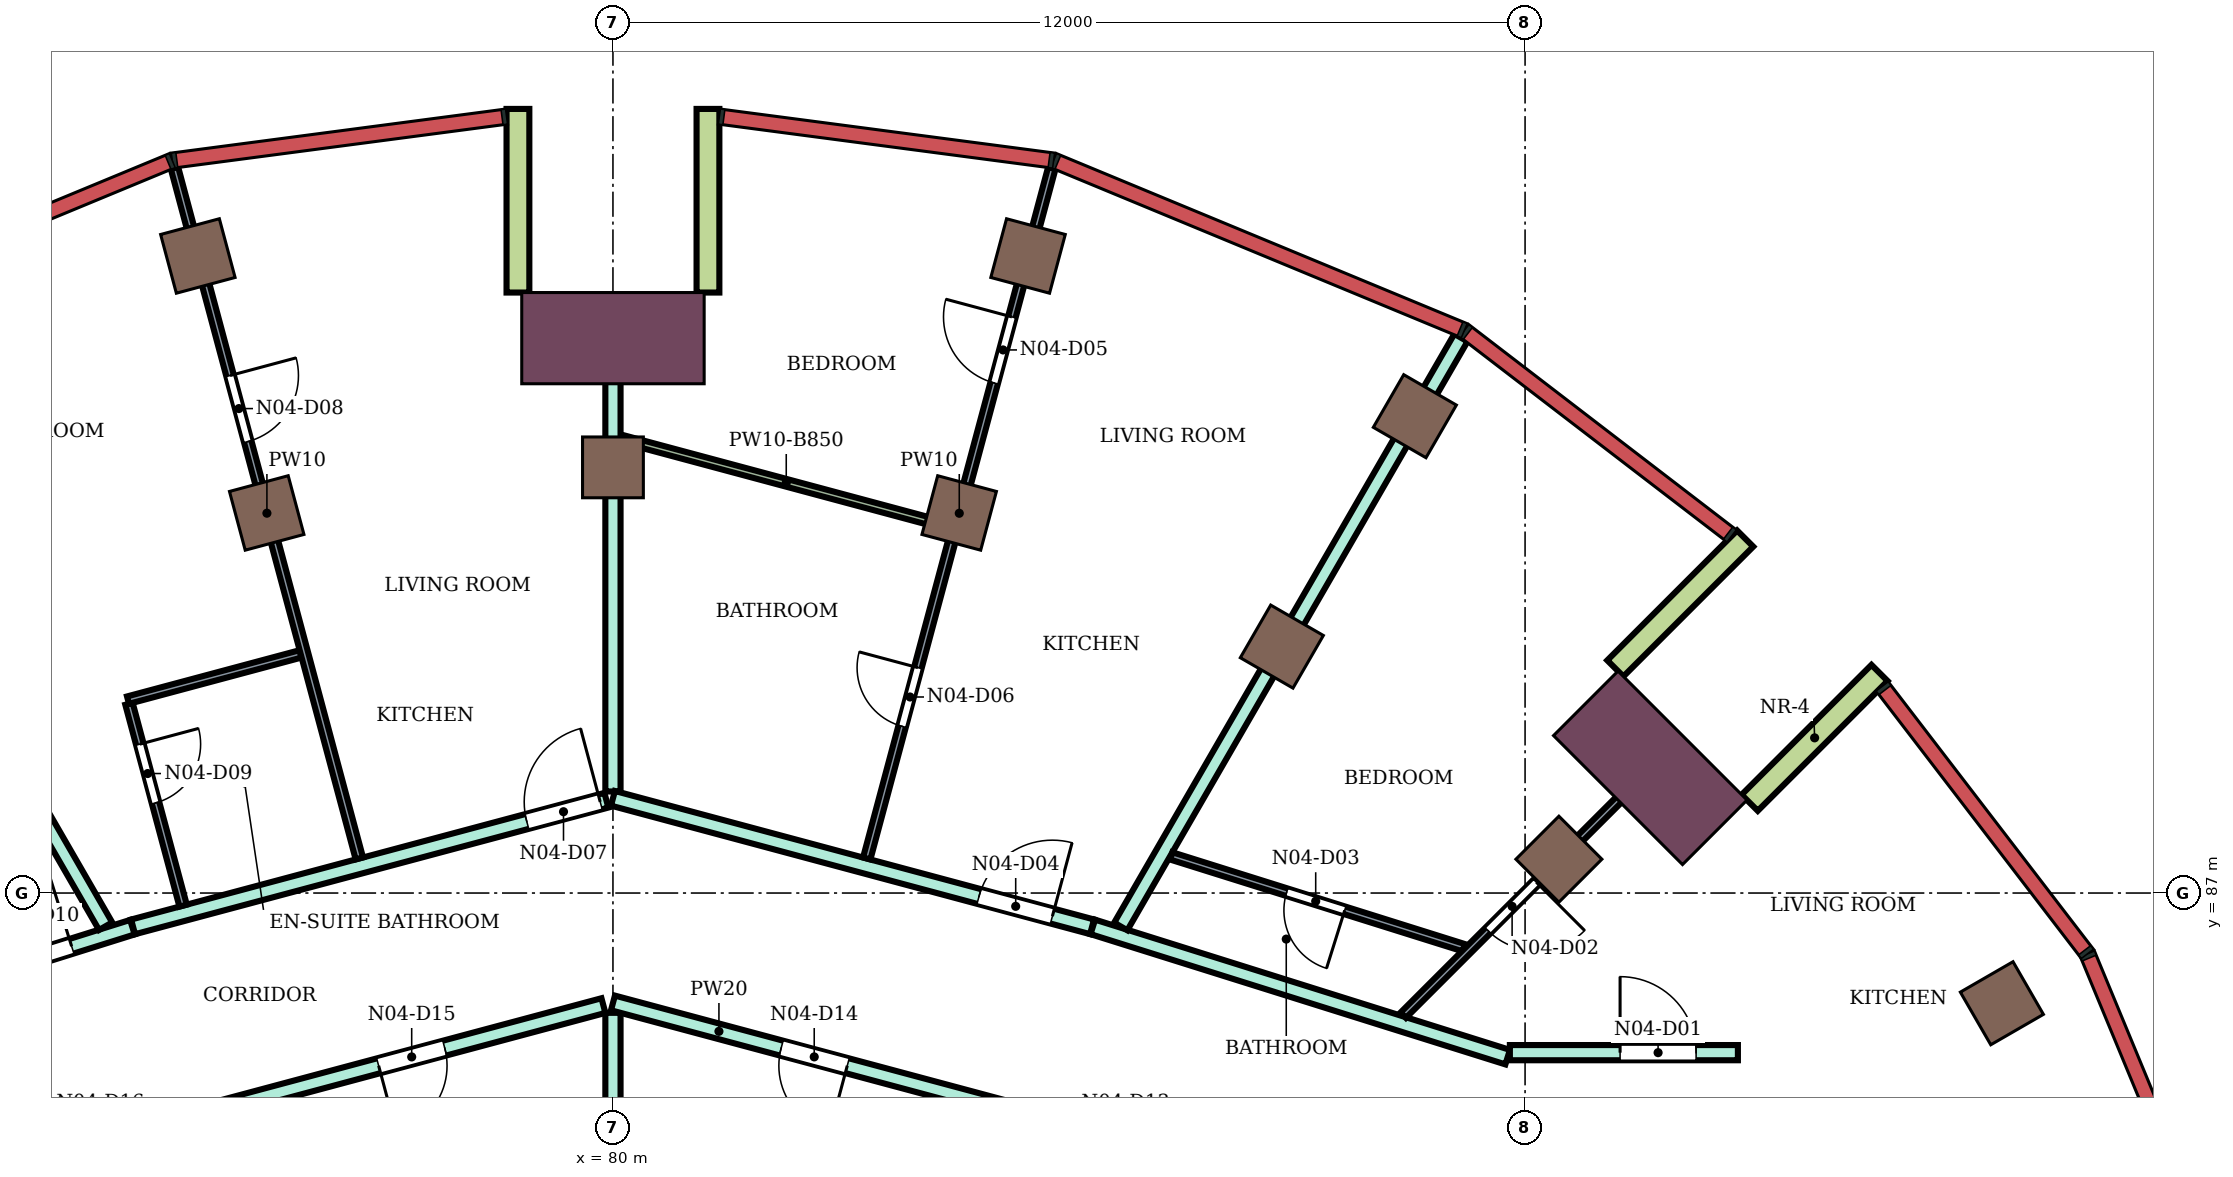
"""IFC4 building model, lengths in metres.
Left out: names, types, materials, properties, quantities, classifications, styles, units other than length and angle.
Written with IfcOpenShell. Run it as: python <this file> out.ifc"""

import sys

from ifc_helpers import new_model, si_unit, direction, frame, frame_2d, origin, origin_2d, place, context, subcontext, project, spatial, rectangle, extrude, element, fill, save


model = new_model("IFC4")
c1 = context("Model", 3, precision=1e-05, world=origin(), true_north=direction((0.0, 1.0)))
c2 = subcontext(c1, "Body", "Model", "MODEL_VIEW")
j1 = project(units=[si_unit("LENGTHUNIT", "METRE"), si_unit("PLANEANGLEUNIT", "RADIAN")], contexts=[c1])
p1 = place(None, origin())
s1 = spatial("IfcSite", under=j1, at=p1, CompositionType="ELEMENT")
p2 = place(p1, origin())
s2 = spatial("IfcBuilding", under=s1, at=p2, CompositionType="ELEMENT")
p3 = place(p2, frame((0.0, 0.0, 305.1)))
s3 = spatial("IfcBuildingStorey", under=s2, at=p3, CompositionType="ELEMENT", Elevation=305.1)
for number, where, z_axis, x_axis in (
    (1, (98.273, 85.55, 0.0), (0.0, 0.0, 1.0), (0.866, 0.5, 0.0)),
    (2, (90.55, 93.273, 0.0), (0.0, 0.0, 1.0), (0.5, 0.866, 0.0)),
    (3, (85.461, 95.381, 0.0), (0.0, 0.0, 1.0), (0.259, 0.966, 0.0)),
    (4, (74.539, 95.381, 0.0), (0.0, 0.0, 1.0), (-0.259, 0.966, 0.0)),
    (5, (92.445, 87.445, 0.0), (0.0, 0.0, 1.0), (0.707, 0.707, 0.0)),
    (6, (88.8, 90.242, 0.0), (0.0, 0.0, 1.0), (0.5, 0.866, 0.0)),
    (7, (84.555, 92.0, 0.0), (0.0, 0.0, 1.0), (0.259, 0.966, 0.0)),
    (8, (80.0, 92.6, 0.0), (0.0, 0.0, 1.0), (0.0, 1.0, 0.0)),
    (9, (75.445, 92.0, 0.0), (0.0, 0.0, 1.0), (-0.259, 0.966, 0.0)),
):
    element("IfcColumn", number, at=place(p3, frame(where, z_axis=z_axis, x_axis=x_axis)), inside=s3, PredefinedType="COLUMN", context=c2, shape_type="SweptSolid", body=[
        extrude(rectangle(XDim=0.8, YDim=0.8, at=origin_2d()), origin(), (0.0, 0.0, 1.0), 4.2),
    ])
for number, where, z_axis, x_axis in (
    (10, (93.647, 88.647, 0.0), (0.0, 0.0, 1.0), (0.707, 0.707, 0.0)),
    (11, (80.0, 94.3, 0.0), (0.0, 0.0, 1.0), (0.0, 1.0, 0.0)),
):
    element("IfcColumn", number, at=place(p3, frame(where, z_axis=z_axis, x_axis=x_axis)), inside=s3, PredefinedType="COLUMN", context=c2, shape_type="SweptSolid", body=[
        extrude(rectangle(XDim=1.2, YDim=2.4, at=origin_2d()), origin(), (0.0, 0.0, 1.0), 4.2),
    ])
for number, where, z_axis, x_axis in (
    (12, (94.955, 88.188, 0.0), (0.0, 0.0, 1.0), (0.707, 0.707, 0.0)),
    (13, (93.188, 89.955, 0.0), (0.0, 0.0, 1.0), (0.707, 0.707, 0.0)),
    (14, (81.25, 94.9, 0.0), (0.0, 0.0, 1.0), (0.0, 1.0, 0.0)),
    (15, (78.75, 94.9, 0.0), (0.0, 0.0, 1.0), (0.0, 1.0, 0.0)),
):
    element("IfcWall", number, at=place(p3, frame(where, z_axis=z_axis, x_axis=x_axis)), inside=s3, PredefinedType="NOTDEFINED", context=c2, shape_type="SweptSolid", body=[
        extrude(rectangle(XDim=2.416, YDim=0.3, at=frame_2d((1.208, 0.0))), origin(), (0.0, 0.0, 1.0), 4.2),
    ])
p4 = place(p3, frame((68.2, 84.833, 0.0), z_axis=(0.0, 0.0, 1.0), x_axis=(0.954191968402, 0.299195065863, 0.0)))
e16 = element("IfcWall", 16, at=p4, inside=s3, PredefinedType="PARTITIONING", context=c2, shape_type="SweptSolid", body=[
    extrude(rectangle(XDim=5.74, YDim=0.2, at=frame_2d((2.87, 0.0))), origin(), (0.0, 0.0, 1.0), 3.75),
])
p5 = place(p4, frame((3.903, 0.0, 0.0)))
e17 = element("IfcOpeningElement", 17, at=p5, cuts=e16, PredefinedType="OPENING", context=c2, shape_type="SweptSolid", body=[
    extrude(rectangle(XDim=1.0, YDim=2.1, at=frame_2d((0.5, 1.05))), frame((0.0, 0.11, 0.0), z_axis=(0.0, -1.0, 0.0), x_axis=(1.0, 0.0, 0.0)), (0.0, 0.0, 1.0), 0.22),
])
p6 = place(p3, frame((68.854, 94.312, 0.0), z_axis=(0.0, 0.0, 1.0), x_axis=(0.499901994742, -0.866081979753, 0.0)))
e18 = element("IfcWall", 18, at=p6, inside=s3, PredefinedType="PARTITIONING", context=c2, shape_type="SweptSolid", body=[
    extrude(rectangle(XDim=8.946, YDim=0.2, at=frame_2d((4.473, 0.0))), origin(), (0.0, 0.0, 1.0), 3.75),
])
p7 = place(p3, frame((73.687, 86.555, 0.0), z_axis=(0.0, 0.0, 1.0), x_axis=(0.966020868517, 0.258464081818, 0.0)))
e19 = element("IfcWall", 19, at=p7, inside=s3, PredefinedType="PARTITIONING", context=c2, shape_type="SweptSolid", body=[
    extrude(rectangle(XDim=6.446, YDim=0.2, at=frame_2d((3.223, 0.0))), origin(), (0.0, 0.0, 1.0), 3.75),
])
p8 = place(p7, frame((5.362, 0.0, 0.0)))
e20 = element("IfcOpeningElement", 20, at=p8, cuts=e19, PredefinedType="OPENING", context=c2, shape_type="SweptSolid", body=[
    extrude(rectangle(XDim=1.0, YDim=2.1, at=frame_2d((0.5, 1.05))), frame((0.0, 0.11, 0.0), z_axis=(0.0, -1.0, 0.0), x_axis=(1.0, 0.0, 0.0)), (0.0, 0.0, 1.0), 0.22),
])
p9 = place(p3, frame((74.413, 84.057, 0.0), z_axis=(0.0, 0.0, 1.0), x_axis=(0.965972135939, 0.258646153246, 0.0)))
e21 = element("IfcWall", 21, at=p9, inside=s3, PredefinedType="PARTITIONING", context=c2, shape_type="SweptSolid", body=[
    extrude(rectangle(XDim=5.654, YDim=0.2, at=frame_2d((2.827, 0.0))), origin(), (0.0, 0.0, 1.0), 3.75),
])
p10 = place(p9, frame((2.593, 0.0, 0.0)))
e22 = element("IfcOpeningElement", 22, at=p10, cuts=e21, PredefinedType="OPENING", context=c2, shape_type="SweptSolid", body=[
    extrude(rectangle(XDim=0.9, YDim=2.1, at=frame_2d((0.45, 1.05))), frame((0.0, 0.11, 0.0), z_axis=(0.0, -1.0, 0.0), x_axis=(1.0, 0.0, 0.0)), (0.0, 0.0, 1.0), 0.22),
])
p11 = place(p3, frame((80.0, 82.699, 0.0), z_axis=(0.0, 0.0, 1.0), x_axis=(0.0, 1.0, 0.0)))
e23 = element("IfcWall", 23, at=p11, inside=s3, PredefinedType="PARTITIONING", context=c2, shape_type="SweptSolid", body=[
    extrude(rectangle(XDim=2.725, YDim=0.2, at=frame_2d((1.363, 0.0))), origin(), (0.0, 0.0, 1.0), 3.75),
])
p12 = place(p3, frame((80.0, 85.554, 0.0), z_axis=(0.0, 0.0, 1.0), x_axis=(0.965928989968, -0.258807237802, 0.0)))
e24 = element("IfcWall", 24, at=p12, inside=s3, PredefinedType="PARTITIONING", context=c2, shape_type="SweptSolid", body=[
    extrude(rectangle(XDim=5.774, YDim=0.2, at=frame_2d((2.887, 0.0))), origin(), (0.0, 0.0, 1.0), 3.75),
])
p13 = place(p12, frame((2.292, 0.0, 0.0)))
e25 = element("IfcOpeningElement", 25, at=p13, cuts=e24, PredefinedType="OPENING", context=c2, shape_type="SweptSolid", body=[
    extrude(rectangle(XDim=0.9, YDim=2.1, at=frame_2d((0.45, 1.05))), frame((0.0, 0.11, 0.0), z_axis=(0.0, -1.0, 0.0), x_axis=(1.0, 0.0, 0.0)), (0.0, 0.0, 1.0), 0.22),
])
p14 = place(p3, frame((80.0, 88.336, 0.0), z_axis=(0.0, 0.0, 1.0), x_axis=(0.0, 1.0, 0.0)))
e26 = element("IfcWall", 26, at=p14, inside=s3, PredefinedType="PARTITIONING", context=c2, shape_type="SweptSolid", body=[
    extrude(rectangle(XDim=6.364, YDim=0.2, at=frame_2d((3.182, 0.0))), origin(), (0.0, 0.0, 1.0), 3.75),
])
p15 = place(p3, frame((80.0, 88.246, 0.0), z_axis=(0.0, 0.0, 1.0), x_axis=(0.965866355913, -0.25904088966, 0.0)))
e27 = element("IfcWall", 27, at=p15, inside=s3, PredefinedType="PARTITIONING", context=c2, shape_type="SweptSolid", body=[
    extrude(rectangle(XDim=6.526, YDim=0.2, at=frame_2d((3.263, 0.0))), origin(), (0.0, 0.0, 1.0), 3.75),
])
p16 = place(p15, frame((4.986, 0.0, 0.0)))
e28 = element("IfcOpeningElement", 28, at=p16, cuts=e27, PredefinedType="OPENING", context=c2, shape_type="SweptSolid", body=[
    extrude(rectangle(XDim=1.0, YDim=2.1, at=frame_2d((0.5, 1.05))), frame((0.0, 0.11, 0.0), z_axis=(0.0, -1.0, 0.0), x_axis=(1.0, 0.0, 0.0)), (0.0, 0.0, 1.0), 0.22),
])
p17 = place(p3, frame((86.313, 86.554, 0.0), z_axis=(0.0, 0.0, 1.0), x_axis=(0.954081217458, -0.299548043717, 0.0)))
e29 = element("IfcWall", 29, at=p17, inside=s3, PredefinedType="PARTITIONING", context=c2, shape_type="SweptSolid", body=[
    extrude(rectangle(XDim=5.721, YDim=0.2, at=frame_2d((2.86, 0.0))), origin(), (0.0, 0.0, 1.0), 3.75),
])
p18 = place(p3, frame((86.681, 86.56, 0.0), z_axis=(0.0, 0.0, 1.0), x_axis=(0.500262593568, 0.865873742226, 0.0)))
e30 = element("IfcWall", 30, at=p18, inside=s3, PredefinedType="PARTITIONING", context=c2, shape_type="SweptSolid", body=[
    extrude(rectangle(XDim=8.946, YDim=0.2, at=frame_2d((4.473, 0.0))), origin(), (0.0, 0.0, 1.0), 3.75),
])
p19 = place(p3, frame((91.8, 84.9, 0.0), z_axis=(0.0, 0.0, 1.0), x_axis=(1.0, 0.0, 0.0)))
e31 = element("IfcWall", 31, at=p19, inside=s3, PredefinedType="PARTITIONING", context=c2, shape_type="SweptSolid", body=[
    extrude(rectangle(XDim=3.0, YDim=0.2, at=frame_2d((1.5, 0.0))), origin(), (0.0, 0.0, 1.0), 3.75),
])
p20 = place(p19, frame((1.45, 0.0, 0.0)))
e32 = element("IfcOpeningElement", 32, at=p20, cuts=e31, PredefinedType="OPENING", context=c2, shape_type="SweptSolid", body=[
    extrude(rectangle(XDim=1.0, YDim=2.1, at=frame_2d((0.5, 1.05))), frame((0.0, 0.11, 0.0), z_axis=(0.0, -1.0, 0.0), x_axis=(1.0, 0.0, 0.0)), (0.0, 0.0, 1.0), 0.22),
])
p21 = place(p3, frame((73.633, 89.49, 0.0), z_axis=(0.0, 0.0, 1.0), x_axis=(0.259005329799, -0.965875892201, 0.0)))
e33 = element("IfcWall", 33, at=p21, inside=s3, PredefinedType="PARTITIONING", context=c2, shape_type="SweptSolid", body=[
    extrude(rectangle(XDim=2.75, YDim=0.1, at=frame_2d((1.375, 0.0))), origin(), (0.0, 0.0, 1.0), 3.75),
])
p22 = place(p21, frame((0.55, 0.0, 0.0)))
e34 = element("IfcOpeningElement", 34, at=p22, cuts=e33, PredefinedType="OPENING", context=c2, shape_type="SweptSolid", body=[
    extrude(rectangle(XDim=0.8, YDim=2.1, at=frame_2d((0.4, 1.05))), frame((0.0, 0.06, 0.0), z_axis=(0.0, -1.0, 0.0), x_axis=(1.0, 0.0, 0.0)), (0.0, 0.0, 1.0), 0.12),
])
p23 = place(p3, frame((73.62, 89.538, 0.0), z_axis=(0.0, 0.0, 1.0), x_axis=(0.965948051503, 0.258736085224, 0.0)))
e35 = element("IfcWall", 35, at=p23, inside=s3, PredefinedType="PARTITIONING", context=c2, shape_type="SweptSolid", body=[
    extrude(rectangle(XDim=2.35, YDim=0.1, at=frame_2d((1.175, 0.0))), origin(), (0.0, 0.0, 1.0), 3.75),
])
p24 = place(p3, frame((74.231, 96.539, 0.0), z_axis=(0.0, 0.0, 1.0), x_axis=(0.258666006211, -0.965966819943, 0.0)))
e36 = element("IfcWall", 36, at=p24, inside=s3, PredefinedType="PARTITIONING", context=c2, shape_type="SweptSolid", body=[
    extrude(rectangle(XDim=9.404, YDim=0.1, at=frame_2d((4.702, 0.0))), origin(), (0.0, 0.0, 1.0), 3.75),
])
p25 = place(p24, frame((2.827, 0.0, 0.0)))
e37 = element("IfcOpeningElement", 37, at=p25, cuts=e36, PredefinedType="OPENING", context=c2, shape_type="SweptSolid", body=[
    extrude(rectangle(XDim=0.9, YDim=2.1, at=frame_2d((0.45, 1.05))), frame((0.0, 0.06, 0.0), z_axis=(0.0, -1.0, 0.0), x_axis=(1.0, 0.0, 0.0)), (0.0, 0.0, 1.0), 0.12),
])
p26 = place(p3, frame((80.106, 92.98, 0.0), z_axis=(0.0, 0.0, 1.0), x_axis=(0.965835883926, -0.259154481575, 0.0)))
e38 = element("IfcWall", 38, at=p26, inside=s3, PredefinedType="PARTITIONING", context=c2, shape_type="SweptSolid", body=[
    extrude(rectangle(XDim=4.501, YDim=0.1, at=frame_2d((2.25, 0.0))), origin(), (0.0, 0.0, 1.0), 3.35),
])
p27 = place(p3, frame((83.339, 87.455, 0.0), z_axis=(0.0, 0.0, 1.0), x_axis=(0.258921222541, 0.965898442135, 0.0)))
e39 = element("IfcWall", 39, at=p27, inside=s3, PredefinedType="PARTITIONING", context=c2, shape_type="SweptSolid", body=[
    extrude(rectangle(XDim=9.404, YDim=0.1, at=frame_2d((4.702, 0.0))), origin(), (0.0, 0.0, 1.0), 3.75),
])
p28 = place(p27, frame((6.476, 0.0, 0.0)))
e40 = element("IfcOpeningElement", 40, at=p28, cuts=e39, PredefinedType="OPENING", context=c2, shape_type="SweptSolid", body=[
    extrude(rectangle(XDim=0.9, YDim=2.1, at=frame_2d((0.45, 1.05))), frame((0.0, 0.06, 0.0), z_axis=(0.0, -1.0, 0.0), x_axis=(1.0, 0.0, 0.0)), (0.0, 0.0, 1.0), 0.12),
])
p29 = place(p27, frame((1.799, 0.0, 0.0)))
e41 = element("IfcOpeningElement", 41, at=p29, cuts=e39, PredefinedType="OPENING", context=c2, shape_type="SweptSolid", body=[
    extrude(rectangle(XDim=0.8, YDim=2.1, at=frame_2d((0.4, 1.05))), frame((0.0, 0.06, 0.0), z_axis=(0.0, -1.0, 0.0), x_axis=(1.0, 0.0, 0.0)), (0.0, 0.0, 1.0), 0.12),
])
p30 = place(p3, frame((87.345, 87.488, 0.0), z_axis=(0.0, 0.0, 1.0), x_axis=(0.954151912322, -0.299322782647, 0.0)))
e42 = element("IfcWall", 42, at=p30, inside=s3, PredefinedType="PARTITIONING", context=c2, shape_type="SweptSolid", body=[
    extrude(rectangle(XDim=4.032, YDim=0.1, at=frame_2d((2.016, 0.0))), origin(), (0.0, 0.0, 1.0), 3.75),
])
p31 = place(p30, frame((1.591, 0.0, 0.0)))
e43 = element("IfcOpeningElement", 43, at=p31, cuts=e42, PredefinedType="OPENING", context=c2, shape_type="SweptSolid", body=[
    extrude(rectangle(XDim=0.8, YDim=2.1, at=frame_2d((0.4, 1.05))), frame((0.0, 0.06, 0.0), z_axis=(0.0, -1.0, 0.0), x_axis=(1.0, 0.0, 0.0)), (0.0, 0.0, 1.0), 0.12),
])
p32 = place(p3, frame((90.397, 85.393, 0.0), z_axis=(0.0, 0.0, 1.0), x_axis=(0.70720443438, 0.707009114505, 0.0)))
e44 = element("IfcWall", 44, at=p32, inside=s3, PredefinedType="PARTITIONING", context=c2, shape_type="SweptSolid", body=[
    extrude(rectangle(XDim=5.0, YDim=0.1, at=frame_2d((2.5, 0.0))), origin(), (0.0, 0.0, 1.0), 3.75),
])
p33 = place(p32, frame((1.575, 0.0, 0.0)))
e45 = element("IfcOpeningElement", 45, at=p33, cuts=e44, PredefinedType="OPENING", context=c2, shape_type="SweptSolid", body=[
    extrude(rectangle(XDim=0.9, YDim=2.1, at=frame_2d((0.45, 1.05))), frame((0.0, 0.06, 0.0), z_axis=(0.0, -1.0, 0.0), x_axis=(1.0, 0.0, 0.0)), (0.0, 0.0, 1.0), 0.12),
])
p34 = place(p20, origin())
e46 = element("IfcDoor", 46, at=p34, inside=s3, OperationType="SINGLE_SWING_LEFT", PredefinedType="DOOR", context=c2, shape_type="SweptSolid", body=[
    extrude(rectangle(XDim=1.0, YDim=2.1, at=frame_2d((0.5, 1.05))), frame((0.0, 0.025, 0.0), z_axis=(0.0, -1.0, 0.0), x_axis=(1.0, 0.0, 0.0)), (0.0, 0.0, 1.0), 0.05),
])
fill(e32, e46)
p35 = place(p33, frame((0.9, 0.0, 0.0), z_axis=(0.0, 0.0, 1.0), x_axis=(-1.0, 0.0, 0.0)))
e47 = element("IfcDoor", 47, at=p35, inside=s3, OperationType="SINGLE_SWING_LEFT", PredefinedType="DOOR", context=c2, shape_type="SweptSolid", body=[
    extrude(rectangle(XDim=0.9, YDim=2.1, at=frame_2d((0.45, 1.05))), frame((0.0, 0.025, 0.0), z_axis=(0.0, -1.0, 0.0), x_axis=(1.0, 0.0, 0.0)), (0.0, 0.0, 1.0), 0.05),
])
fill(e45, e47)
p36 = place(p31, frame((0.8, 0.0, 0.0), z_axis=(0.0, 0.0, 1.0), x_axis=(-1.0, 0.0, 0.0)))
e48 = element("IfcDoor", 48, at=p36, inside=s3, OperationType="SINGLE_SWING_LEFT", PredefinedType="DOOR", context=c2, shape_type="SweptSolid", body=[
    extrude(rectangle(XDim=0.8, YDim=2.1, at=frame_2d((0.4, 1.05))), frame((0.0, 0.025, 0.0), z_axis=(0.0, -1.0, 0.0), x_axis=(1.0, 0.0, 0.0)), (0.0, 0.0, 1.0), 0.05),
])
fill(e43, e48)
p37 = place(p16, origin())
e49 = element("IfcDoor", 49, at=p37, inside=s3, OperationType="SINGLE_SWING_RIGHT", PredefinedType="DOOR", context=c2, shape_type="SweptSolid", body=[
    extrude(rectangle(XDim=1.0, YDim=2.1, at=frame_2d((0.5, 1.05))), frame((0.0, 0.025, 0.0), z_axis=(0.0, -1.0, 0.0), x_axis=(1.0, 0.0, 0.0)), (0.0, 0.0, 1.0), 0.05),
])
fill(e28, e49)
p38 = place(p28, origin())
e50 = element("IfcDoor", 50, at=p38, inside=s3, OperationType="SINGLE_SWING_RIGHT", PredefinedType="DOOR", context=c2, shape_type="SweptSolid", body=[
    extrude(rectangle(XDim=0.9, YDim=2.1, at=frame_2d((0.45, 1.05))), frame((0.0, 0.025, 0.0), z_axis=(0.0, -1.0, 0.0), x_axis=(1.0, 0.0, 0.0)), (0.0, 0.0, 1.0), 0.05),
])
fill(e40, e50)
p39 = place(p29, origin())
e51 = element("IfcDoor", 51, at=p39, inside=s3, OperationType="SINGLE_SWING_RIGHT", PredefinedType="DOOR", context=c2, shape_type="SweptSolid", body=[
    extrude(rectangle(XDim=0.8, YDim=2.1, at=frame_2d((0.4, 1.05))), frame((0.0, 0.025, 0.0), z_axis=(0.0, -1.0, 0.0), x_axis=(1.0, 0.0, 0.0)), (0.0, 0.0, 1.0), 0.05),
])
fill(e41, e51)
p40 = place(p8, origin())
e52 = element("IfcDoor", 52, at=p40, inside=s3, OperationType="SINGLE_SWING_RIGHT", PredefinedType="DOOR", context=c2, shape_type="SweptSolid", body=[
    extrude(rectangle(XDim=1.0, YDim=2.1, at=frame_2d((0.5, 1.05))), frame((0.0, 0.025, 0.0), z_axis=(0.0, -1.0, 0.0), x_axis=(1.0, 0.0, 0.0)), (0.0, 0.0, 1.0), 0.05),
])
fill(e20, e52)
p41 = place(p25, origin())
e53 = element("IfcDoor", 53, at=p41, inside=s3, OperationType="SINGLE_SWING_LEFT", PredefinedType="DOOR", context=c2, shape_type="SweptSolid", body=[
    extrude(rectangle(XDim=0.9, YDim=2.1, at=frame_2d((0.45, 1.05))), frame((0.0, 0.025, 0.0), z_axis=(0.0, -1.0, 0.0), x_axis=(1.0, 0.0, 0.0)), (0.0, 0.0, 1.0), 0.05),
])
fill(e37, e53)
p42 = place(p22, origin())
e54 = element("IfcDoor", 54, at=p42, inside=s3, OperationType="SINGLE_SWING_LEFT", PredefinedType="DOOR", context=c2, shape_type="SweptSolid", body=[
    extrude(rectangle(XDim=0.8, YDim=2.1, at=frame_2d((0.4, 1.05))), frame((0.0, 0.025, 0.0), z_axis=(0.0, -1.0, 0.0), x_axis=(1.0, 0.0, 0.0)), (0.0, 0.0, 1.0), 0.05),
])
fill(e34, e54)
p43 = place(p5, origin())
e55 = element("IfcDoor", 55, at=p43, inside=s3, OperationType="SINGLE_SWING_RIGHT", PredefinedType="DOOR", context=c2, shape_type="SweptSolid", body=[
    extrude(rectangle(XDim=1.0, YDim=2.1, at=frame_2d((0.5, 1.05))), frame((0.0, 0.025, 0.0), z_axis=(0.0, -1.0, 0.0), x_axis=(1.0, 0.0, 0.0)), (0.0, 0.0, 1.0), 0.05),
])
fill(e17, e55)
p44 = place(p13, frame((0.9, 0.0, 0.0), z_axis=(0.0, 0.0, 1.0), x_axis=(-1.0, 0.0, 0.0)))
e56 = element("IfcDoor", 56, at=p44, inside=s3, OperationType="SINGLE_SWING_LEFT", PredefinedType="DOOR", context=c2, shape_type="SweptSolid", body=[
    extrude(rectangle(XDim=0.9, YDim=2.1, at=frame_2d((0.45, 1.05))), frame((0.0, 0.025, 0.0), z_axis=(0.0, -1.0, 0.0), x_axis=(1.0, 0.0, 0.0)), (0.0, 0.0, 1.0), 0.05),
])
fill(e25, e56)
p45 = place(p10, frame((0.9, 0.0, 0.0), z_axis=(0.0, 0.0, 1.0), x_axis=(-1.0, 0.0, 0.0)))
e57 = element("IfcDoor", 57, at=p45, inside=s3, OperationType="SINGLE_SWING_RIGHT", PredefinedType="DOOR", context=c2, shape_type="SweptSolid", body=[
    extrude(rectangle(XDim=0.9, YDim=2.1, at=frame_2d((0.45, 1.05))), frame((0.0, 0.025, 0.0), z_axis=(0.0, -1.0, 0.0), x_axis=(1.0, 0.0, 0.0)), (0.0, 0.0, 1.0), 0.05),
])
fill(e22, e57)
save(model, sys.argv[1])
